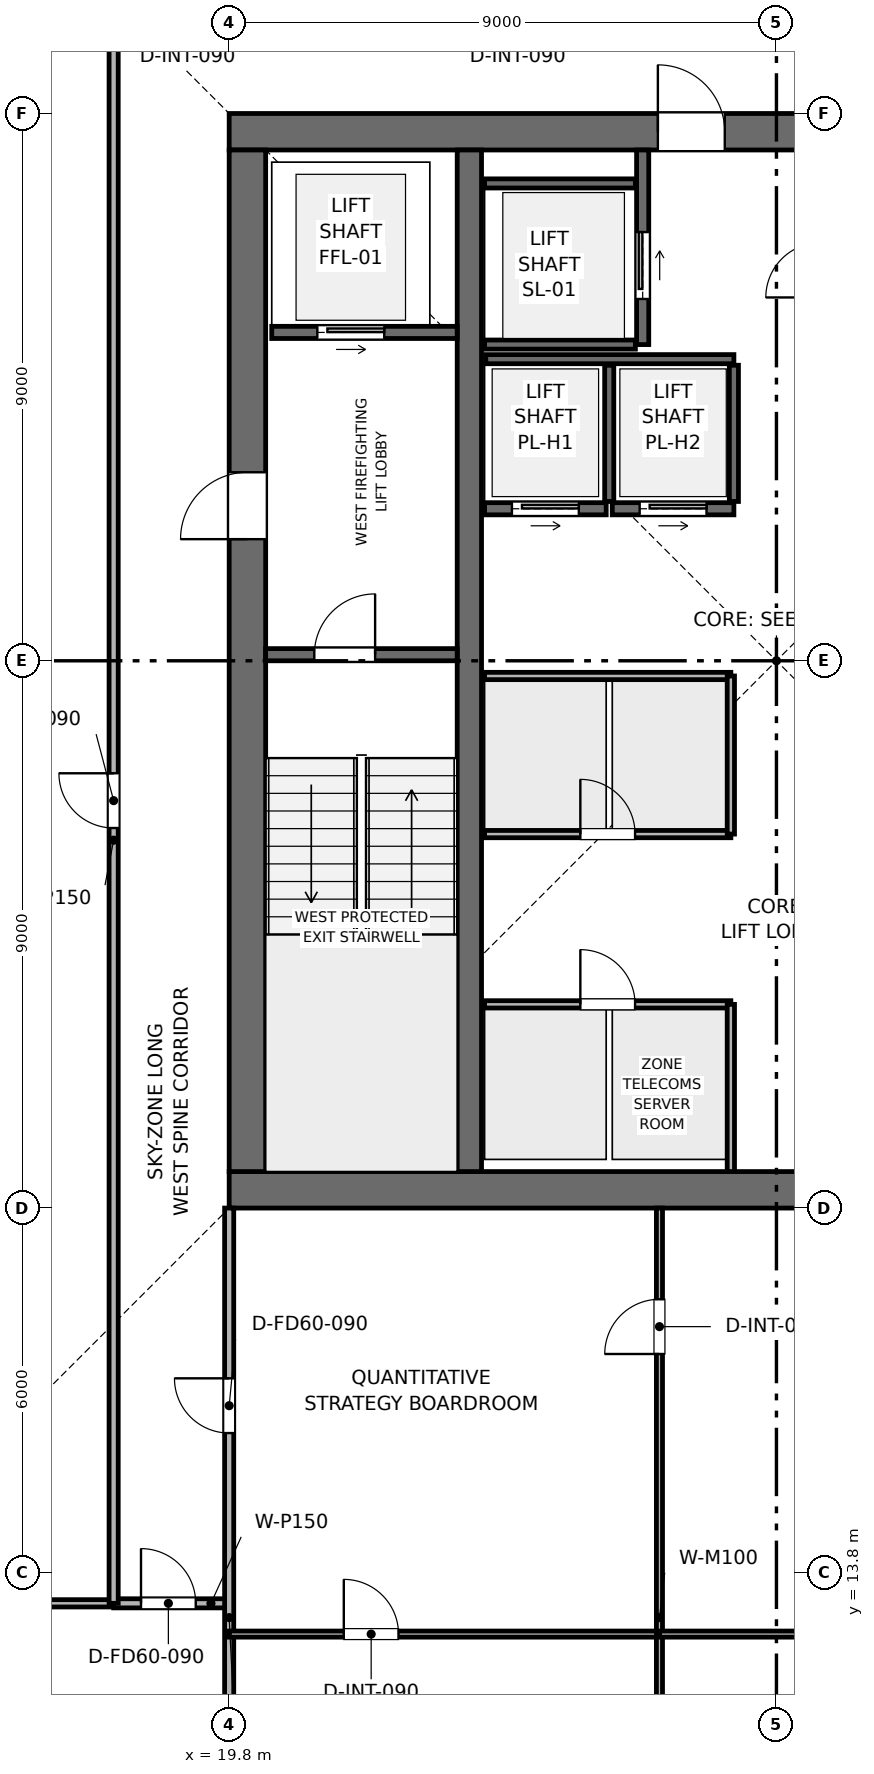
"""IFC4 building model, lengths in metres.
Left out: names, types, materials, properties, quantities, classifications, styles, units other than length and angle.
Written with IfcOpenShell. Run it as: python <this file> out.ifc"""

import sys

from ifc_helpers import new_model, si_unit, direction, frame, frame_2d, origin, place, context, subcontext, project, spatial, rectangle, extrude, element, fill, save


model = new_model("IFC4")
c1 = context("Model", 3, precision=1e-05, world=origin(), true_north=direction((0.0, 1.0)))
c2 = subcontext(c1, "Body", "Model", "MODEL_VIEW")
j1 = project(units=[si_unit("LENGTHUNIT", "METRE"), si_unit("PLANEANGLEUNIT", "RADIAN")], contexts=[c1])
p1 = place(None, origin())
s1 = spatial("IfcSite", under=j1, at=p1, CompositionType="ELEMENT")
p2 = place(p1, origin())
s2 = spatial("IfcBuilding", under=s1, at=p2, CompositionType="ELEMENT")
p3 = place(p2, frame((0.0, 0.0, 344.25)))
s3 = spatial("IfcBuildingStorey", under=s2, at=p3, CompositionType="ELEMENT", Elevation=344.25)
p4 = place(p3, frame((19.8, 20.1, 0.0), z_axis=(0.0, 0.0, 1.0), x_axis=(1.0, 0.0, 0.0)))
e1 = element("IfcWall", 1, at=p4, inside=s3, PredefinedType="SHEAR", context=c2, shape_type="SweptSolid", body=[
    extrude(rectangle(XDim=18.0, YDim=0.6, at=frame_2d((9.0, 0.0))), origin(), (0.0, 0.0, 1.0), 3.75),
])
p5 = place(p3, frame((19.8, 37.5, 0.0), z_axis=(0.0, 0.0, 1.0), x_axis=(1.0, 0.0, 0.0)))
e2 = element("IfcWall", 2, at=p5, inside=s3, PredefinedType="SHEAR", context=c2, shape_type="SweptSolid", body=[
    extrude(rectangle(XDim=18.0, YDim=0.6, at=frame_2d((9.0, 0.0))), origin(), (0.0, 0.0, 1.0), 3.75),
])
p6 = place(p5, frame((7.05, 0.0, 0.0)))
e3 = element("IfcOpeningElement", 3, at=p6, cuts=e2, PredefinedType="OPENING", context=c2, shape_type="SweptSolid", body=[
    extrude(rectangle(XDim=1.1, YDim=2.15, at=frame_2d((0.55, 1.075))), frame((0.0, 0.31, 0.0), z_axis=(0.0, -1.0, 0.0), x_axis=(1.0, 0.0, 0.0)), (0.0, 0.0, 1.0), 0.62),
])
p7 = place(p3, frame((20.1, 20.4, 0.0), z_axis=(0.0, 0.0, 1.0), x_axis=(0.0, 1.0, 0.0)))
e4 = element("IfcWall", 4, at=p7, inside=s3, PredefinedType="SHEAR", context=c2, shape_type="SweptSolid", body=[
    extrude(rectangle(XDim=16.8, YDim=0.6, at=frame_2d((8.4, 0.0))), origin(), (0.0, 0.0, 1.0), 3.75),
])
p8 = place(p7, frame((10.4, 0.0, 0.0)))
e5 = element("IfcOpeningElement", 5, at=p8, cuts=e4, PredefinedType="OPENING", context=c2, shape_type="SweptSolid", body=[
    extrude(rectangle(XDim=1.1, YDim=2.15, at=frame_2d((0.55, 1.075))), frame((0.0, 0.31, 0.0), z_axis=(0.0, -1.0, 0.0), x_axis=(1.0, 0.0, 0.0)), (0.0, 0.0, 1.0), 0.62),
])
p9 = place(p3, frame((23.75, 20.4, 0.0), z_axis=(0.0, 0.0, 1.0), x_axis=(0.0, 1.0, 0.0)))
e6 = element("IfcWall", 6, at=p9, inside=s3, PredefinedType="SHEAR", context=c2, shape_type="SweptSolid", body=[
    extrude(rectangle(XDim=16.8, YDim=0.4, at=frame_2d((8.4, 0.0))), origin(), (0.0, 0.0, 1.0), 3.75),
])
p10 = place(p3, frame((20.4, 28.9, 0.0), z_axis=(0.0, 0.0, 1.0), x_axis=(1.0, 0.0, 0.0)))
e7 = element("IfcWall", 7, at=p10, inside=s3, PredefinedType="SHEAR", context=c2, shape_type="SweptSolid", body=[
    extrude(rectangle(XDim=3.15, YDim=0.2, at=frame_2d((1.575, 0.0))), origin(), (0.0, 0.0, 1.0), 3.51),
])
p11 = place(p10, frame((0.8, 0.0, 0.0)))
e8 = element("IfcOpeningElement", 8, at=p11, cuts=e7, PredefinedType="OPENING", context=c2, shape_type="SweptSolid", body=[
    extrude(rectangle(XDim=1.0, YDim=2.1, at=frame_2d((0.5, 1.05))), frame((0.0, 0.11, 0.0), z_axis=(0.0, -1.0, 0.0), x_axis=(1.0, 0.0, 0.0)), (0.0, 0.0, 1.0), 0.22),
])
p12 = place(p3, frame((20.5, 34.2, 0.0), z_axis=(0.0, 0.0, 1.0), x_axis=(1.0, 0.0, 0.0)))
e9 = element("IfcWall", 9, at=p12, inside=s3, PredefinedType="SHEAR", context=c2, shape_type="SweptSolid", body=[
    extrude(rectangle(XDim=3.05, YDim=0.2, at=frame_2d((1.525, 0.0))), origin(), (0.0, 0.0, 1.0), 3.51),
])
p13 = place(p12, frame((0.75, 0.0, 0.0)))
e10 = element("IfcOpeningElement", 10, at=p13, cuts=e9, PredefinedType="OPENING", context=c2, shape_type="SweptSolid", body=[
    extrude(rectangle(XDim=1.1, YDim=2.15, at=frame_2d((0.55, 1.075))), frame((0.0, 0.11, 0.0), z_axis=(0.0, -1.0, 0.0), x_axis=(1.0, 0.0, 0.0)), (0.0, 0.0, 1.0), 0.22),
])
p14 = place(p3, frame((26.6, 34.0, 0.0), z_axis=(0.0, 0.0, 1.0), x_axis=(0.0, 1.0, 0.0)))
e11 = element("IfcWall", 11, at=p14, inside=s3, PredefinedType="SHEAR", context=c2, shape_type="SweptSolid", body=[
    extrude(rectangle(XDim=3.2, YDim=0.2, at=frame_2d((1.6, 0.0))), origin(), (0.0, 0.0, 1.0), 3.51),
])
p15 = place(p14, frame((0.75, 0.0, 0.0)))
e12 = element("IfcOpeningElement", 12, at=p15, cuts=e11, PredefinedType="OPENING", context=c2, shape_type="SweptSolid", body=[
    extrude(rectangle(XDim=1.1, YDim=2.15, at=frame_2d((0.55, 1.075))), frame((0.0, 0.11, 0.0), z_axis=(0.0, -1.0, 0.0), x_axis=(1.0, 0.0, 0.0)), (0.0, 0.0, 1.0), 0.22),
])
for number, where, z_axis, x_axis in (
    (13, (24.0, 34.0, 0.0), (0.0, 0.0, 1.0), (1.0, 0.0, 0.0)),
    (14, (24.0, 36.65, 0.0), (0.0, 0.0, 1.0), (1.0, 0.0, 0.0)),
):
    element("IfcWall", number, at=place(p3, frame(where, z_axis=z_axis, x_axis=x_axis)), inside=s3, PredefinedType="SHEAR", context=c2, shape_type="SweptSolid", body=[
        extrude(rectangle(XDim=2.48, YDim=0.15, at=frame_2d((1.24, 0.0))), origin(), (0.0, 0.0, 1.0), 3.51),
    ])
p16 = place(p3, frame((24.0, 31.3, 0.0), z_axis=(0.0, 0.0, 1.0), x_axis=(1.0, 0.0, 0.0)))
e15 = element("IfcWall", 15, at=p16, inside=s3, PredefinedType="SHEAR", context=c2, shape_type="SweptSolid", body=[
    extrude(rectangle(XDim=2.0, YDim=0.2, at=frame_2d((1.0, 0.0))), origin(), (0.0, 0.0, 1.0), 3.51),
])
p17 = place(p16, frame((0.45, 0.0, 0.0)))
e16 = element("IfcOpeningElement", 16, at=p17, cuts=e15, PredefinedType="OPENING", context=c2, shape_type="SweptSolid", body=[
    extrude(rectangle(XDim=1.1, YDim=2.15, at=frame_2d((0.55, 1.075))), frame((0.0, 0.11, 0.0), z_axis=(0.0, -1.0, 0.0), x_axis=(1.0, 0.0, 0.0)), (0.0, 0.0, 1.0), 0.22),
])
p18 = place(p3, frame((26.1, 31.3, 0.0), z_axis=(0.0, 0.0, 1.0), x_axis=(1.0, 0.0, 0.0)))
e17 = element("IfcWall", 17, at=p18, inside=s3, PredefinedType="SHEAR", context=c2, shape_type="SweptSolid", body=[
    extrude(rectangle(XDim=2.0, YDim=0.2, at=frame_2d((1.0, 0.0))), origin(), (0.0, 0.0, 1.0), 3.51),
])
p19 = place(p18, frame((0.45, 0.0, 0.0)))
e18 = element("IfcOpeningElement", 18, at=p19, cuts=e17, PredefinedType="OPENING", context=c2, shape_type="SweptSolid", body=[
    extrude(rectangle(XDim=1.1, YDim=2.15, at=frame_2d((0.55, 1.075))), frame((0.0, 0.11, 0.0), z_axis=(0.0, -1.0, 0.0), x_axis=(1.0, 0.0, 0.0)), (0.0, 0.0, 1.0), 0.22),
])
p20 = place(p3, frame((24.02, 33.76, 0.0), z_axis=(0.0, 0.0, 1.0), x_axis=(1.0, 0.0, 0.0)))
e19 = element("IfcWall", 19, at=p20, inside=s3, PredefinedType="SHEAR", context=c2, shape_type="SweptSolid", body=[
    extrude(rectangle(XDim=4.08, YDim=0.15, at=frame_2d((2.04, 0.0))), origin(), (0.0, 0.0, 1.0), 3.51),
])
for number, where, z_axis, x_axis in (
    (20, (26.05, 31.42, 0.0), (0.0, 0.0, 1.0), (0.0, 1.0, 0.0)),
    (21, (28.1, 31.42, 0.0), (0.0, 0.0, 1.0), (0.0, 1.0, 0.0)),
):
    element("IfcWall", number, at=place(p3, frame(where, z_axis=z_axis, x_axis=x_axis)), inside=s3, PredefinedType="SHEAR", context=c2, shape_type="SweptSolid", body=[
        extrude(rectangle(XDim=2.24, YDim=0.15, at=frame_2d((1.12, 0.0))), origin(), (0.0, 0.0, 1.0), 3.51),
    ])
p21 = place(p3, frame((24.0, 23.15, 0.0), z_axis=(0.0, 0.0, 1.0), x_axis=(1.0, 0.0, 0.0)))
e22 = element("IfcWall", 22, at=p21, inside=s3, PredefinedType="PARTITIONING", context=c2, shape_type="SweptSolid", body=[
    extrude(rectangle(XDim=4.05, YDim=0.12, at=frame_2d((2.025, 0.0))), origin(), (0.0, 0.0, 1.0), 3.51),
])
p22 = place(p21, frame((1.575, 0.0, 0.0)))
e23 = element("IfcOpeningElement", 23, at=p22, cuts=e22, PredefinedType="OPENING", context=c2, shape_type="SweptSolid", body=[
    extrude(rectangle(XDim=0.9, YDim=2.1, at=frame_2d((0.45, 1.05))), frame((0.0, 0.07, 0.0), z_axis=(0.0, -1.0, 0.0), x_axis=(1.0, 0.0, 0.0)), (0.0, 0.0, 1.0), 0.14),
])
p23 = place(p3, frame((28.05, 20.4, 0.0), z_axis=(0.0, 0.0, 1.0), x_axis=(0.0, 1.0, 0.0)))
e24 = element("IfcWall", 24, at=p23, inside=s3, PredefinedType="PARTITIONING", context=c2, shape_type="SweptSolid", body=[
    extrude(rectangle(XDim=2.75, YDim=0.12, at=frame_2d((1.375, 0.0))), origin(), (0.0, 0.0, 1.0), 3.51),
])
p24 = place(p3, frame((24.0, 25.95, 0.0), z_axis=(0.0, 0.0, 1.0), x_axis=(1.0, 0.0, 0.0)))
e25 = element("IfcWall", 25, at=p24, inside=s3, PredefinedType="PARTITIONING", context=c2, shape_type="SweptSolid", body=[
    extrude(rectangle(XDim=4.05, YDim=0.12, at=frame_2d((2.025, 0.0))), origin(), (0.0, 0.0, 1.0), 3.51),
])
p25 = place(p24, frame((1.575, 0.0, 0.0)))
e26 = element("IfcOpeningElement", 26, at=p25, cuts=e25, PredefinedType="OPENING", context=c2, shape_type="SweptSolid", body=[
    extrude(rectangle(XDim=0.9, YDim=2.1, at=frame_2d((0.45, 1.05))), frame((0.0, 0.07, 0.0), z_axis=(0.0, -1.0, 0.0), x_axis=(1.0, 0.0, 0.0)), (0.0, 0.0, 1.0), 0.14),
])
p26 = place(p3, frame((24.0, 28.55, 0.0), z_axis=(0.0, 0.0, 1.0), x_axis=(1.0, 0.0, 0.0)))
e27 = element("IfcWall", 27, at=p26, inside=s3, PredefinedType="PARTITIONING", context=c2, shape_type="SweptSolid", body=[
    extrude(rectangle(XDim=4.05, YDim=0.12, at=frame_2d((2.025, 0.0))), origin(), (0.0, 0.0, 1.0), 3.51),
])
p27 = place(p3, frame((28.05, 25.95, 0.0), z_axis=(0.0, 0.0, 1.0), x_axis=(0.0, 1.0, 0.0)))
e28 = element("IfcWall", 28, at=p27, inside=s3, PredefinedType="PARTITIONING", context=c2, shape_type="SweptSolid", body=[
    extrude(rectangle(XDim=2.6, YDim=0.12, at=frame_2d((1.3, 0.0))), origin(), (0.0, 0.0, 1.0), 3.51),
])
p28 = place(p3, frame((13.3, 13.3, 0.0), z_axis=(0.0, 0.0, 1.0), x_axis=(1.0, 0.0, 0.0)))
e29 = element("IfcWall", 29, at=p28, inside=s3, PredefinedType="PARTITIONING", context=c2, shape_type="SweptSolid", body=[
    extrude(rectangle(XDim=4.6, YDim=0.12, at=frame_2d((2.3, 0.0))), origin(), (0.0, 0.0, 1.0), 3.195),
])
p29 = place(p3, frame((17.9, 13.3, 0.0), z_axis=(0.0, 0.0, 1.0), x_axis=(1.0, 0.0, 0.0)))
e30 = element("IfcWall", 30, at=p29, inside=s3, PredefinedType="PARTITIONING", context=c2, shape_type="SweptSolid", body=[
    extrude(rectangle(XDim=1.9, YDim=0.15, at=frame_2d((0.95, 0.0))), origin(), (0.0, 0.0, 1.0), 3.51),
])
p30 = place(p29, frame((0.45, 0.0, 0.0)))
e31 = element("IfcOpeningElement", 31, at=p30, cuts=e30, PredefinedType="OPENING", context=c2, shape_type="SweptSolid", body=[
    extrude(rectangle(XDim=0.9, YDim=2.1, at=frame_2d((0.45, 1.05))), frame((0.0, 0.085, 0.0), z_axis=(0.0, -1.0, 0.0), x_axis=(1.0, 0.0, 0.0)), (0.0, 0.0, 1.0), 0.17),
])
p31 = place(p3, frame((19.8, 7.63, 0.0), z_axis=(0.0, 0.0, 1.0), x_axis=(0.0, 1.0, 0.0)))
e32 = element("IfcWall", 32, at=p31, inside=s3, PredefinedType="PARTITIONING", context=c2, shape_type="SweptSolid", body=[
    extrude(rectangle(XDim=12.17, YDim=0.15, at=frame_2d((6.085, 0.0))), origin(), (0.0, 0.0, 1.0), 3.095),
])
p32 = place(p31, frame((8.47, 0.0, 0.0)))
e33 = element("IfcOpeningElement", 33, at=p32, cuts=e32, PredefinedType="OPENING", context=c2, shape_type="SweptSolid", body=[
    extrude(rectangle(XDim=0.9, YDim=2.1, at=frame_2d((0.45, 1.05))), frame((0.0, 0.085, 0.0), z_axis=(0.0, -1.0, 0.0), x_axis=(1.0, 0.0, 0.0)), (0.0, 0.0, 1.0), 0.17),
])
p33 = place(p3, frame((19.8, 12.794, 0.0), z_axis=(0.0, 0.0, 1.0), x_axis=(1.0, 0.0, 0.0)))
e34 = element("IfcWall", 34, at=p33, inside=s3, PredefinedType="MOVABLE", context=c2, shape_type="SweptSolid", body=[
    extrude(rectangle(XDim=7.076, YDim=0.1, at=frame_2d((3.538, 0.0))), origin(), (0.0, 0.0, 1.0), 3.095),
])
p34 = place(p33, frame((1.885, 0.0, 0.0)))
e35 = element("IfcOpeningElement", 35, at=p34, cuts=e34, PredefinedType="OPENING", context=c2, shape_type="SweptSolid", body=[
    extrude(rectangle(XDim=0.9, YDim=2.1, at=frame_2d((0.45, 1.05))), frame((0.0, 0.06, 0.0), z_axis=(0.0, -1.0, 0.0), x_axis=(1.0, 0.0, 0.0)), (0.0, 0.0, 1.0), 0.12),
])
p35 = place(p3, frame((26.876, 7.63, 0.0), z_axis=(0.0, 0.0, 1.0), x_axis=(0.0, 1.0, 0.0)))
e36 = element("IfcWall", 36, at=p35, inside=s3, PredefinedType="MOVABLE", context=c2, shape_type="SweptSolid", body=[
    extrude(rectangle(XDim=12.17, YDim=0.1, at=frame_2d((6.085, 0.0))), origin(), (0.0, 0.0, 1.0), 3.135),
])
p36 = place(p35, frame((9.77, 0.0, 0.0)))
e37 = element("IfcOpeningElement", 37, at=p36, cuts=e36, PredefinedType="OPENING", context=c2, shape_type="SweptSolid", body=[
    extrude(rectangle(XDim=0.9, YDim=2.1, at=frame_2d((0.45, 1.05))), frame((0.0, 0.06, 0.0), z_axis=(0.0, -1.0, 0.0), x_axis=(1.0, 0.0, 0.0)), (0.0, 0.0, 1.0), 0.12),
])
p37 = place(p3, frame((26.876, 12.794, 0.0), z_axis=(0.0, 0.0, 1.0), x_axis=(1.0, 0.0, 0.0)))
e38 = element("IfcWall", 38, at=p37, inside=s3, PredefinedType="MOVABLE", context=c2, shape_type="SweptSolid", body=[
    extrude(rectangle(XDim=17.424, YDim=0.1, at=frame_2d((8.712, 0.0))), origin(), (0.0, 0.0, 1.0), 3.095),
])
p38 = place(p37, frame((8.262, 0.0, 0.0)))
e39 = element("IfcOpeningElement", 39, at=p38, cuts=e38, PredefinedType="OPENING", context=c2, shape_type="SweptSolid", body=[
    extrude(rectangle(XDim=0.9, YDim=2.1, at=frame_2d((0.45, 1.05))), frame((0.0, 0.06, 0.0), z_axis=(0.0, -1.0, 0.0), x_axis=(1.0, 0.0, 0.0)), (0.0, 0.0, 1.0), 0.12),
])
p39 = place(p3, frame((17.9, 13.3, 0.0), z_axis=(0.0, 0.0, 1.0), x_axis=(0.0, 1.0, 0.0)))
e40 = element("IfcWall", 40, at=p39, inside=s3, PredefinedType="PARTITIONING", context=c2, shape_type="SweptSolid", body=[
    extrude(rectangle(XDim=26.4, YDim=0.15, at=frame_2d((13.2, 0.0))), origin(), (0.0, 0.0, 1.0), 3.095),
])
p40 = place(p39, frame((12.75, 0.0, 0.0)))
e41 = element("IfcOpeningElement", 41, at=p40, cuts=e40, PredefinedType="OPENING", context=c2, shape_type="SweptSolid", body=[
    extrude(rectangle(XDim=0.9, YDim=2.1, at=frame_2d((0.45, 1.05))), frame((0.0, 0.085, 0.0), z_axis=(0.0, -1.0, 0.0), x_axis=(1.0, 0.0, 0.0)), (0.0, 0.0, 1.0), 0.17),
])
p41 = place(p11, origin())
e42 = element("IfcDoor", 42, at=p41, inside=s3, OperationType="SINGLE_SWING_RIGHT", PredefinedType="DOOR", context=c2, shape_type="SweptSolid", body=[
    extrude(rectangle(XDim=1.0, YDim=2.1, at=frame_2d((0.5, 1.05))), frame((0.0, 0.025, 0.0), z_axis=(0.0, -1.0, 0.0), x_axis=(1.0, 0.0, 0.0)), (0.0, 0.0, 1.0), 0.05),
])
fill(e8, e42)
p42 = place(p13, origin())
e43 = element("IfcDoor", 43, at=p42, inside=s3, OperationType="SLIDING_TO_RIGHT", PredefinedType="DOOR", context=c2, shape_type="SweptSolid", body=[
    extrude(rectangle(XDim=1.1, YDim=2.15, at=frame_2d((0.55, 1.075))), frame((0.0, 0.025, 0.0), z_axis=(0.0, -1.0, 0.0), x_axis=(1.0, 0.0, 0.0)), (0.0, 0.0, 1.0), 0.05),
])
fill(e10, e43)
p43 = place(p15, origin())
e44 = element("IfcDoor", 44, at=p43, inside=s3, OperationType="SLIDING_TO_RIGHT", PredefinedType="DOOR", context=c2, shape_type="SweptSolid", body=[
    extrude(rectangle(XDim=1.1, YDim=2.15, at=frame_2d((0.55, 1.075))), frame((0.0, 0.025, 0.0), z_axis=(0.0, -1.0, 0.0), x_axis=(1.0, 0.0, 0.0)), (0.0, 0.0, 1.0), 0.05),
])
fill(e12, e44)
p44 = place(p17, origin())
e45 = element("IfcDoor", 45, at=p44, inside=s3, OperationType="SLIDING_TO_RIGHT", PredefinedType="DOOR", context=c2, shape_type="SweptSolid", body=[
    extrude(rectangle(XDim=1.1, YDim=2.15, at=frame_2d((0.55, 1.075))), frame((0.0, 0.025, 0.0), z_axis=(0.0, -1.0, 0.0), x_axis=(1.0, 0.0, 0.0)), (0.0, 0.0, 1.0), 0.05),
])
fill(e16, e45)
p45 = place(p19, origin())
e46 = element("IfcDoor", 46, at=p45, inside=s3, OperationType="SLIDING_TO_RIGHT", PredefinedType="DOOR", context=c2, shape_type="SweptSolid", body=[
    extrude(rectangle(XDim=1.1, YDim=2.15, at=frame_2d((0.55, 1.075))), frame((0.0, 0.025, 0.0), z_axis=(0.0, -1.0, 0.0), x_axis=(1.0, 0.0, 0.0)), (0.0, 0.0, 1.0), 0.05),
])
fill(e18, e46)
p46 = place(p22, origin())
e47 = element("IfcDoor", 47, at=p46, inside=s3, OperationType="SINGLE_SWING_LEFT", PredefinedType="DOOR", context=c2, shape_type="SweptSolid", body=[
    extrude(rectangle(XDim=0.9, YDim=2.1, at=frame_2d((0.45, 1.05))), frame((0.0, 0.025, 0.0), z_axis=(0.0, -1.0, 0.0), x_axis=(1.0, 0.0, 0.0)), (0.0, 0.0, 1.0), 0.05),
])
fill(e23, e47)
p47 = place(p25, origin())
e48 = element("IfcDoor", 48, at=p47, inside=s3, OperationType="SINGLE_SWING_LEFT", PredefinedType="DOOR", context=c2, shape_type="SweptSolid", body=[
    extrude(rectangle(XDim=0.9, YDim=2.1, at=frame_2d((0.45, 1.05))), frame((0.0, 0.025, 0.0), z_axis=(0.0, -1.0, 0.0), x_axis=(1.0, 0.0, 0.0)), (0.0, 0.0, 1.0), 0.05),
])
fill(e26, e48)
p48 = place(p30, origin())
e49 = element("IfcDoor", 49, at=p48, inside=s3, OperationType="SINGLE_SWING_LEFT", PredefinedType="DOOR", context=c2, shape_type="SweptSolid", body=[
    extrude(rectangle(XDim=0.9, YDim=2.1, at=frame_2d((0.45, 1.05))), frame((0.0, 0.025, 0.0), z_axis=(0.0, -1.0, 0.0), x_axis=(1.0, 0.0, 0.0)), (0.0, 0.0, 1.0), 0.05),
])
fill(e31, e49)
p49 = place(p32, origin())
e50 = element("IfcDoor", 50, at=p49, inside=s3, OperationType="SINGLE_SWING_RIGHT", PredefinedType="DOOR", context=c2, shape_type="SweptSolid", body=[
    extrude(rectangle(XDim=0.9, YDim=2.1, at=frame_2d((0.45, 1.05))), frame((0.0, 0.025, 0.0), z_axis=(0.0, -1.0, 0.0), x_axis=(1.0, 0.0, 0.0)), (0.0, 0.0, 1.0), 0.05),
])
fill(e33, e50)
p50 = place(p34, origin())
e51 = element("IfcDoor", 51, at=p50, inside=s3, OperationType="SINGLE_SWING_LEFT", PredefinedType="DOOR", context=c2, shape_type="SweptSolid", body=[
    extrude(rectangle(XDim=0.9, YDim=2.1, at=frame_2d((0.45, 1.05))), frame((0.0, 0.025, 0.0), z_axis=(0.0, -1.0, 0.0), x_axis=(1.0, 0.0, 0.0)), (0.0, 0.0, 1.0), 0.05),
])
fill(e35, e51)
p51 = place(p36, origin())
e52 = element("IfcDoor", 52, at=p51, inside=s3, OperationType="SINGLE_SWING_LEFT", PredefinedType="DOOR", context=c2, shape_type="SweptSolid", body=[
    extrude(rectangle(XDim=0.9, YDim=2.1, at=frame_2d((0.45, 1.05))), frame((0.0, 0.025, 0.0), z_axis=(0.0, -1.0, 0.0), x_axis=(1.0, 0.0, 0.0)), (0.0, 0.0, 1.0), 0.05),
])
fill(e37, e52)
p52 = place(p40, origin())
e53 = element("IfcDoor", 53, at=p52, inside=s3, OperationType="SINGLE_SWING_RIGHT", PredefinedType="DOOR", context=c2, shape_type="SweptSolid", body=[
    extrude(rectangle(XDim=0.9, YDim=2.1, at=frame_2d((0.45, 1.05))), frame((0.0, 0.025, 0.0), z_axis=(0.0, -1.0, 0.0), x_axis=(1.0, 0.0, 0.0)), (0.0, 0.0, 1.0), 0.05),
])
fill(e41, e53)
p53 = place(p8, origin())
e54 = element("IfcDoor", 54, at=p53, inside=s3, OperationType="SINGLE_SWING_LEFT", PredefinedType="DOOR", context=c2, shape_type="SweptSolid", body=[
    extrude(rectangle(XDim=1.1, YDim=2.15, at=frame_2d((0.55, 1.075))), frame((0.0, 0.025, 0.0), z_axis=(0.0, -1.0, 0.0), x_axis=(1.0, 0.0, 0.0)), (0.0, 0.0, 1.0), 0.05),
])
fill(e5, e54)
p54 = place(p6, origin())
e55 = element("IfcDoor", 55, at=p54, inside=s3, OperationType="SINGLE_SWING_LEFT", PredefinedType="DOOR", context=c2, shape_type="SweptSolid", body=[
    extrude(rectangle(XDim=1.1, YDim=2.15, at=frame_2d((0.55, 1.075))), frame((0.0, 0.025, 0.0), z_axis=(0.0, -1.0, 0.0), x_axis=(1.0, 0.0, 0.0)), (0.0, 0.0, 1.0), 0.05),
])
fill(e3, e55)
save(model, sys.argv[1])
